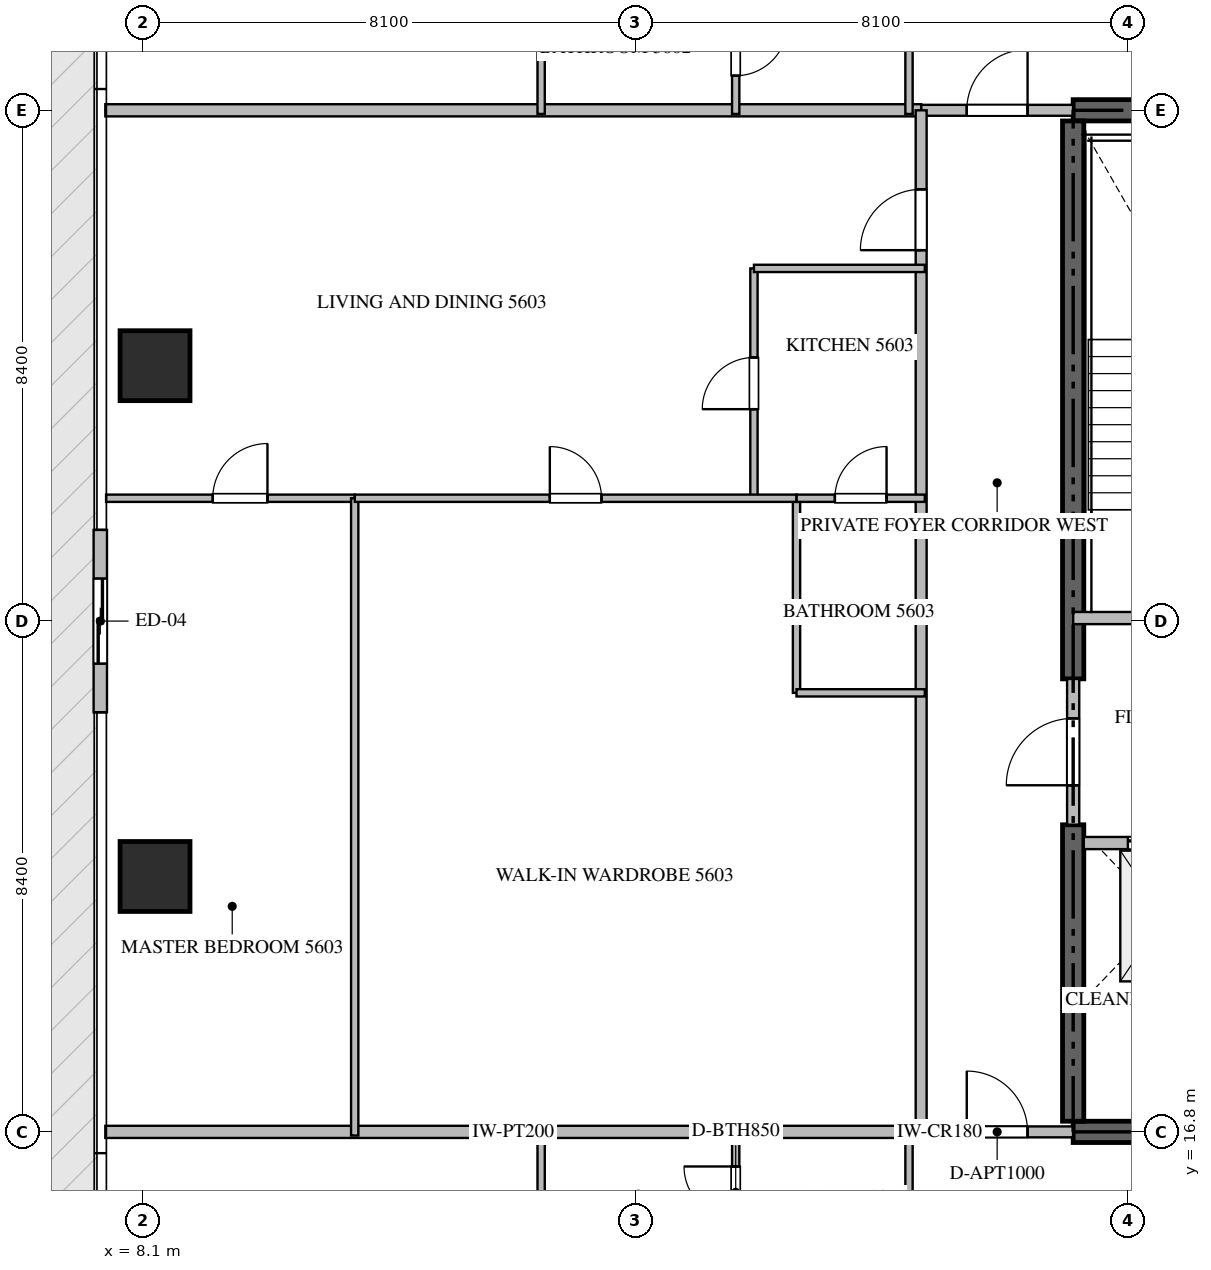
"""IFC4 building model, lengths in metres.
Left out: names, types, materials, properties, quantities, classifications, styles, units other than length and angle.
Written with IfcOpenShell. Run it as: python <this file> out.ifc"""

import sys

from ifc_helpers import new_model, si_unit, direction, frame, frame_2d, origin, origin_2d, place, context, subcontext, project, spatial, rectangle, extrude, source, transform, mapped, element, fill, save


model = new_model("IFC4")
c1 = context("Model", 3, precision=1e-05, world=origin(), true_north=direction((0.0, 1.0)))
c2 = subcontext(c1, "Body", "Model", "MODEL_VIEW")
j1 = project(units=[si_unit("LENGTHUNIT", "METRE"), si_unit("PLANEANGLEUNIT", "RADIAN")], contexts=[c1])
p1 = place(None, origin())
s1 = spatial("IfcSite", under=j1, at=p1, CompositionType="ELEMENT")
p2 = place(p1, origin())
s2 = spatial("IfcBuilding", under=s1, at=p2, CompositionType="ELEMENT")
p3 = place(p2, frame((0.0, 0.0, 225.85)))
s3 = spatial("IfcBuildingStorey", under=s2, at=p3, CompositionType="ELEMENT", Elevation=225.85)
for number, where, z_axis, x_axis in (
    (1, (23.4, 16.8, -0.26), (0.0, 0.0, 1.0), (1.0, 0.0, 0.0)),
    (2, (41.4, 33.6, -0.26), (0.0, 0.0, 1.0), (-1.0, 0.0, 0.0)),
):
    element("IfcWall", number, at=place(p3, frame(where, z_axis=z_axis, x_axis=x_axis)), inside=s3, PredefinedType="SHEAR", context=c2, shape_type="SweptSolid", body=[
        extrude(rectangle(XDim=18.0, YDim=0.35, at=frame_2d((9.0, 0.0))), origin(), (0.0, 0.0, 1.0), 3.848),
    ])
p4 = place(p3, frame((23.4, 16.975, -0.26), z_axis=(0.0, 0.0, 1.0), x_axis=(0.0, 1.0, 0.0)))
e3 = element("IfcWall", 3, at=p4, inside=s3, PredefinedType="SHEAR", context=c2, shape_type="SweptSolid", body=[
    extrude(rectangle(XDim=4.875, YDim=0.35, at=frame_2d((2.438, 0.0))), origin(), (0.0, 0.0, 1.0), 3.848),
])
p5 = place(p3, frame((23.4, 24.25, -0.26), z_axis=(0.0, 0.0, 1.0), x_axis=(0.0, 1.0, 0.0)))
e4 = element("IfcWall", 4, at=p5, inside=s3, PredefinedType="SHEAR", context=c2, shape_type="SweptSolid", body=[
    extrude(rectangle(XDim=9.175, YDim=0.35, at=frame_2d((4.587, 0.0))), origin(), (0.0, 0.0, 1.0), 3.848),
])
m1 = source(origin(), c2, "Body", "SweptSolid", [
    extrude(rectangle(XDim=1.15, YDim=1.15, at=origin_2d()), origin(), (0.0, 0.0, 1.0), 3.85),
])
for number, where, z_axis, x_axis in (
    (5, (8.3, 21.0, -0.26), (0.0, 0.0, 1.0), (1.0, 0.0, 0.0)),
    (6, (8.3, 29.4, -0.26), (0.0, 0.0, 1.0), (1.0, 0.0, 0.0)),
):
    element("IfcColumn", number, at=place(p3, frame(where, z_axis=z_axis, x_axis=x_axis)), inside=s3, PredefinedType="COLUMN", context=c2, shape_type="MappedRepresentation", body=[
        mapped(m1, transform((0.0, 0.0, 0.0), scale=1.0)),
    ])
p6 = place(p3, frame((7.4, 26.7, 0.0), z_axis=(0.0, 0.0, 1.0), x_axis=(0.0, -1.0, 0.0)))
e7 = element("IfcWall", 7, at=p6, inside=s3, PredefinedType="ELEMENTEDWALL", context=c2, shape_type="SweptSolid", body=[
    extrude(rectangle(XDim=3.0, YDim=0.22, at=frame_2d((1.5, 0.0))), origin(), (0.0, 0.0, 1.0), 3.575),
])
p7 = place(p6, frame((0.8, 0.0, 0.0)))
e8 = element("IfcOpeningElement", 8, at=p7, cuts=e7, PredefinedType="OPENING", context=c2, shape_type="SweptSolid", body=[
    extrude(rectangle(XDim=1.4, YDim=2.25, at=frame_2d((0.7, 1.125))), frame((0.0, 0.12, 0.0), z_axis=(0.0, -1.0, 0.0), x_axis=(1.0, 0.0, 0.0)), (0.0, 0.0, 1.0), 0.24),
])
p8 = place(p3, frame((23.4, 25.25, 0.0), z_axis=(0.0, 0.0, 1.0), x_axis=(1.0, 0.0, 0.0)))
e9 = element("IfcWall", 9, at=p8, inside=s3, PredefinedType="STANDARD", context=c2, shape_type="SweptSolid", body=[
    extrude(rectangle(XDim=4.45, YDim=0.2, at=frame_2d((2.225, 0.0))), origin(), (0.0, 0.0, 1.0), 3.59),
])
p9 = place(p8, frame((1.65, 0.0, 0.0)))
e10 = element("IfcOpeningElement", 10, at=p9, cuts=e9, PredefinedType="OPENING", context=c2, shape_type="SweptSolid", body=[
    extrude(rectangle(XDim=1.1, YDim=2.15, at=frame_2d((0.55, 1.075))), frame((0.0, 0.11, 0.0), z_axis=(0.0, -1.0, 0.0), x_axis=(1.0, 0.0, 0.0)), (0.0, 0.0, 1.0), 0.22),
])
p10 = place(p3, frame((23.575, 21.55, 0.0), z_axis=(0.0, 0.0, 1.0), x_axis=(1.0, 0.0, 0.0)))
e11 = element("IfcWall", 11, at=p10, inside=s3, PredefinedType="STANDARD", context=c2, shape_type="SweptSolid", body=[
    extrude(rectangle(XDim=2.475, YDim=0.2, at=frame_2d((1.238, 0.0))), origin(), (0.0, 0.0, 1.0), 3.59),
])
p11 = place(p10, frame((0.725, 0.0, 0.0)))
e12 = element("IfcOpeningElement", 12, at=p11, cuts=e11, PredefinedType="OPENING", context=c2, shape_type="SweptSolid", body=[
    extrude(rectangle(XDim=1.2, YDim=2.2, at=frame_2d((0.6, 1.1))), frame((0.0, 0.11, 0.0), z_axis=(0.0, -1.0, 0.0), x_axis=(1.0, 0.0, 0.0)), (0.0, 0.0, 1.0), 0.22),
])
p12 = place(p3, frame((23.575, 19.05, 0.0), z_axis=(0.0, 0.0, 1.0), x_axis=(1.0, 0.0, 0.0)))
e13 = element("IfcWall", 13, at=p12, inside=s3, PredefinedType="STANDARD", context=c2, shape_type="SweptSolid", body=[
    extrude(rectangle(XDim=2.475, YDim=0.2, at=frame_2d((1.238, 0.0))), origin(), (0.0, 0.0, 1.0), 3.59),
])
p13 = place(p3, frame((23.4, 21.852, 0.0), z_axis=(0.0, 0.0, 1.0), x_axis=(0.0, 1.0, 0.0)))
e14 = element("IfcWall", 14, at=p13, inside=s3, PredefinedType="STANDARD", context=c2, shape_type="SweptSolid", body=[
    extrude(rectangle(XDim=2.396, YDim=0.2, at=frame_2d((1.198, 0.0))), origin(), (0.0, 0.0, 1.0), 3.59),
])
p14 = place(p13, frame((0.648, 0.0, 0.0)))
e15 = element("IfcOpeningElement", 15, at=p14, cuts=e14, PredefinedType="OPENING", context=c2, shape_type="SweptSolid", body=[
    extrude(rectangle(XDim=1.1, YDim=2.15, at=frame_2d((0.55, 1.075))), frame((0.0, 0.11, 0.0), z_axis=(0.0, -1.0, 0.0), x_axis=(1.0, 0.0, 0.0)), (0.0, 0.0, 1.0), 0.22),
])
for number, where, z_axis, x_axis in (
    (16, (7.482, 16.8, 0.0), (0.0, 0.0, 1.0), (1.0, 0.0, 0.0)),
    (17, (7.482, 33.6, 0.0), (0.0, 0.0, 1.0), (1.0, 0.0, 0.0)),
):
    element("IfcWall", number, at=place(p3, frame(where, z_axis=z_axis, x_axis=x_axis)), inside=s3, PredefinedType="PARTITIONING", context=c2, shape_type="SweptSolid", body=[
        extrude(rectangle(XDim=13.418, YDim=0.2, at=frame_2d((6.709, 0.0))), origin(), (0.0, 0.0, 1.0), 3.59),
    ])
p15 = place(p3, frame((20.902, 16.8, 0.0), z_axis=(0.0, 0.0, 1.0), x_axis=(1.0, 0.0, 0.0)))
e18 = element("IfcWall", 18, at=p15, inside=s3, PredefinedType="PARTITIONING", context=c2, shape_type="SweptSolid", body=[
    extrude(rectangle(XDim=2.496, YDim=0.18, at=frame_2d((1.248, 0.0))), origin(), (0.0, 0.0, 1.0), 3.59),
])
p16 = place(p15, frame((0.748, 0.0, 0.0)))
e19 = element("IfcOpeningElement", 19, at=p16, cuts=e18, PredefinedType="OPENING", context=c2, shape_type="SweptSolid", body=[
    extrude(rectangle(XDim=1.0, YDim=2.15, at=frame_2d((0.5, 1.075))), frame((0.0, 0.1, 0.0), z_axis=(0.0, -1.0, 0.0), x_axis=(1.0, 0.0, 0.0)), (0.0, 0.0, 1.0), 0.2),
])
p17 = place(p3, frame((20.902, 33.6, 0.0), z_axis=(0.0, 0.0, 1.0), x_axis=(1.0, 0.0, 0.0)))
e20 = element("IfcWall", 20, at=p17, inside=s3, PredefinedType="PARTITIONING", context=c2, shape_type="SweptSolid", body=[
    extrude(rectangle(XDim=2.496, YDim=0.18, at=frame_2d((1.248, 0.0))), origin(), (0.0, 0.0, 1.0), 3.59),
])
p18 = place(p17, frame((0.748, 0.0, 0.0)))
e21 = element("IfcOpeningElement", 21, at=p18, cuts=e20, PredefinedType="OPENING", context=c2, shape_type="SweptSolid", body=[
    extrude(rectangle(XDim=1.0, YDim=2.15, at=frame_2d((0.5, 1.075))), frame((0.0, 0.1, 0.0), z_axis=(0.0, -1.0, 0.0), x_axis=(1.0, 0.0, 0.0)), (0.0, 0.0, 1.0), 0.2),
])
p19 = place(p3, frame((20.9, 16.8, 0.0), z_axis=(0.0, 0.0, 1.0), x_axis=(0.0, 1.0, 0.0)))
e22 = element("IfcWall", 22, at=p19, inside=s3, PredefinedType="PARTITIONING", context=c2, shape_type="SweptSolid", body=[
    extrude(rectangle(XDim=16.8, YDim=0.18, at=frame_2d((8.4, 0.0))), origin(), (0.0, 0.0, 1.0), 3.59),
])
p20 = place(p19, frame((14.5, 0.0, 0.0)))
e23 = element("IfcOpeningElement", 23, at=p20, cuts=e22, PredefinedType="OPENING", context=c2, shape_type="SweptSolid", body=[
    extrude(rectangle(XDim=1.0, YDim=2.15, at=frame_2d((0.5, 1.075))), frame((0.0, 0.1, 0.0), z_axis=(0.0, -1.0, 0.0), x_axis=(1.0, 0.0, 0.0)), (0.0, 0.0, 1.0), 0.2),
])
p21 = place(p3, frame((20.7, 14.05, 0.0), z_axis=(0.0, 0.0, 1.0), x_axis=(0.0, 1.0, 0.0)))
e24 = element("IfcWall", 24, at=p21, inside=s3, PredefinedType="PARTITIONING", context=c2, shape_type="SweptSolid", body=[
    extrude(rectangle(XDim=2.81, YDim=0.12, at=frame_2d((1.405, 0.0))), origin(), (0.0, 0.0, 1.0), 3.59),
])
p22 = place(p3, frame((14.65, 14.75, 0.0), z_axis=(0.0, 0.0, 1.0), x_axis=(0.0, 1.0, 0.0)))
e25 = element("IfcWall", 25, at=p22, inside=s3, PredefinedType="PARTITIONING", context=c2, shape_type="SweptSolid", body=[
    extrude(rectangle(XDim=2.11, YDim=0.12, at=frame_2d((1.055, 0.0))), origin(), (0.0, 0.0, 1.0), 3.59),
])
p23 = place(p3, frame((17.85, 14.752, 0.0), z_axis=(0.0, 0.0, 1.0), x_axis=(0.0, 1.0, 0.0)))
e26 = element("IfcWall", 26, at=p23, inside=s3, PredefinedType="PARTITIONING", context=c2, shape_type="SweptSolid", body=[
    extrude(rectangle(XDim=2.108, YDim=0.12, at=frame_2d((1.054, 0.0))), origin(), (0.0, 0.0, 1.0), 3.59),
])
p24 = place(p23, frame((0.629, 0.0, 0.0)))
e27 = element("IfcOpeningElement", 27, at=p24, cuts=e26, PredefinedType="OPENING", context=c2, shape_type="SweptSolid", body=[
    extrude(rectangle(XDim=0.85, YDim=2.1, at=frame_2d((0.425, 1.05))), frame((0.0, 0.07, 0.0), z_axis=(0.0, -1.0, 0.0), x_axis=(1.0, 0.0, 0.0)), (0.0, 0.0, 1.0), 0.14),
])
p25 = place(p3, frame((20.7, 36.35, 0.0), z_axis=(0.0, 0.0, 1.0), x_axis=(0.0, -1.0, 0.0)))
e28 = element("IfcWall", 28, at=p25, inside=s3, PredefinedType="PARTITIONING", context=c2, shape_type="SweptSolid", body=[
    extrude(rectangle(XDim=2.81, YDim=0.12, at=frame_2d((1.405, 0.0))), origin(), (0.0, 0.0, 1.0), 3.59),
])
p26 = place(p3, frame((14.65, 35.65, 0.0), z_axis=(0.0, 0.0, 1.0), x_axis=(0.0, -1.0, 0.0)))
e29 = element("IfcWall", 29, at=p26, inside=s3, PredefinedType="PARTITIONING", context=c2, shape_type="SweptSolid", body=[
    extrude(rectangle(XDim=2.11, YDim=0.12, at=frame_2d((1.055, 0.0))), origin(), (0.0, 0.0, 1.0), 3.59),
])
p27 = place(p3, frame((17.85, 35.648, 0.0), z_axis=(0.0, 0.0, 1.0), x_axis=(0.0, -1.0, 0.0)))
e30 = element("IfcWall", 30, at=p27, inside=s3, PredefinedType="PARTITIONING", context=c2, shape_type="SweptSolid", body=[
    extrude(rectangle(XDim=2.108, YDim=0.12, at=frame_2d((1.054, 0.0))), origin(), (0.0, 0.0, 1.0), 3.59),
])
p28 = place(p27, frame((0.629, 0.0, 0.0)))
e31 = element("IfcOpeningElement", 31, at=p28, cuts=e30, PredefinedType="OPENING", context=c2, shape_type="SweptSolid", body=[
    extrude(rectangle(XDim=0.85, YDim=2.1, at=frame_2d((0.425, 1.05))), frame((0.0, 0.07, 0.0), z_axis=(0.0, -1.0, 0.0), x_axis=(1.0, 0.0, 0.0)), (0.0, 0.0, 1.0), 0.14),
])
p29 = place(p3, frame((18.15, 27.22, 0.0), z_axis=(0.0, 0.0, 1.0), x_axis=(0.0, 1.0, 0.0)))
e32 = element("IfcWall", 32, at=p29, inside=s3, PredefinedType="PARTITIONING", context=c2, shape_type="SweptSolid", body=[
    extrude(rectangle(XDim=3.78, YDim=0.12, at=frame_2d((1.89, 0.0))), origin(), (0.0, 0.0, 1.0), 3.59),
])
p30 = place(p29, frame((1.465, 0.0, 0.0)))
e33 = element("IfcOpeningElement", 33, at=p30, cuts=e32, PredefinedType="OPENING", context=c2, shape_type="SweptSolid", body=[
    extrude(rectangle(XDim=0.85, YDim=2.1, at=frame_2d((0.425, 1.05))), frame((0.0, 0.07, 0.0), z_axis=(0.0, -1.0, 0.0), x_axis=(1.0, 0.0, 0.0)), (0.0, 0.0, 1.0), 0.14),
])
p31 = place(p3, frame((18.15, 31.0, 0.0), z_axis=(0.0, 0.0, 1.0), x_axis=(1.0, 0.0, 0.0)))
e34 = element("IfcWall", 34, at=p31, inside=s3, PredefinedType="PARTITIONING", context=c2, shape_type="SweptSolid", body=[
    extrude(rectangle(XDim=2.81, YDim=0.12, at=frame_2d((1.405, 0.0))), origin(), (0.0, 0.0, 1.0), 3.59),
])
p32 = place(p3, frame((7.495, 27.22, 0.0), z_axis=(0.0, 0.0, 1.0), x_axis=(1.0, 0.0, 0.0)))
e35 = element("IfcWall", 35, at=p32, inside=s3, PredefinedType="PARTITIONING", context=c2, shape_type="SweptSolid", body=[
    extrude(rectangle(XDim=4.089, YDim=0.12, at=frame_2d((2.044, 0.0))), origin(), (0.0, 0.0, 1.0), 3.59),
])
p33 = place(p32, frame((1.754, 0.0, 0.0)))
e36 = element("IfcOpeningElement", 36, at=p33, cuts=e35, PredefinedType="OPENING", context=c2, shape_type="SweptSolid", body=[
    extrude(rectangle(XDim=0.9, YDim=2.1, at=frame_2d((0.45, 1.05))), frame((0.0, 0.07, 0.0), z_axis=(0.0, -1.0, 0.0), x_axis=(1.0, 0.0, 0.0)), (0.0, 0.0, 1.0), 0.14),
])
p34 = place(p3, frame((11.584, 16.74, 0.0), z_axis=(0.0, 0.0, 1.0), x_axis=(0.0, 1.0, 0.0)))
e37 = element("IfcWall", 37, at=p34, inside=s3, PredefinedType="PARTITIONING", context=c2, shape_type="SweptSolid", body=[
    extrude(rectangle(XDim=10.48, YDim=0.12, at=frame_2d((5.24, 0.0))), origin(), (0.0, 0.0, 1.0), 3.59),
])
p35 = place(p3, frame((18.85, 24.02, 0.0), z_axis=(0.0, 0.0, 1.0), x_axis=(0.0, 1.0, 0.0)))
e38 = element("IfcWall", 38, at=p35, inside=s3, PredefinedType="PARTITIONING", context=c2, shape_type="SweptSolid", body=[
    extrude(rectangle(XDim=3.2, YDim=0.12, at=frame_2d((1.6, 0.0))), origin(), (0.0, 0.0, 1.0), 3.59),
])
p36 = place(p3, frame((18.85, 24.02, 0.0), z_axis=(0.0, 0.0, 1.0), x_axis=(1.0, 0.0, 0.0)))
e39 = element("IfcWall", 39, at=p36, inside=s3, PredefinedType="PARTITIONING", context=c2, shape_type="SweptSolid", body=[
    extrude(rectangle(XDim=2.11, YDim=0.12, at=frame_2d((1.055, 0.0))), origin(), (0.0, 0.0, 1.0), 3.59),
])
p37 = place(p3, frame((11.586, 27.22, 0.0), z_axis=(0.0, 0.0, 1.0), x_axis=(1.0, 0.0, 0.0)))
e40 = element("IfcWall", 40, at=p37, inside=s3, PredefinedType="PARTITIONING", context=c2, shape_type="SweptSolid", body=[
    extrude(rectangle(XDim=7.264, YDim=0.12, at=frame_2d((3.632, 0.0))), origin(), (0.0, 0.0, 1.0), 3.59),
])
p38 = place(p37, frame((3.207, 0.0, 0.0)))
e41 = element("IfcOpeningElement", 41, at=p38, cuts=e40, PredefinedType="OPENING", context=c2, shape_type="SweptSolid", body=[
    extrude(rectangle(XDim=0.85, YDim=2.1, at=frame_2d((0.425, 1.05))), frame((0.0, 0.07, 0.0), z_axis=(0.0, -1.0, 0.0), x_axis=(1.0, 0.0, 0.0)), (0.0, 0.0, 1.0), 0.14),
])
p39 = place(p3, frame((18.852, 27.22, 0.0), z_axis=(0.0, 0.0, 1.0), x_axis=(1.0, 0.0, 0.0)))
e42 = element("IfcWall", 42, at=p39, inside=s3, PredefinedType="PARTITIONING", context=c2, shape_type="SweptSolid", body=[
    extrude(rectangle(XDim=2.108, YDim=0.12, at=frame_2d((1.054, 0.0))), origin(), (0.0, 0.0, 1.0), 3.59),
])
p40 = place(p39, frame((0.629, 0.0, 0.0)))
e43 = element("IfcOpeningElement", 43, at=p40, cuts=e42, PredefinedType="OPENING", context=c2, shape_type="SweptSolid", body=[
    extrude(rectangle(XDim=0.85, YDim=2.1, at=frame_2d((0.425, 1.05))), frame((0.0, 0.07, 0.0), z_axis=(0.0, -1.0, 0.0), x_axis=(1.0, 0.0, 0.0)), (0.0, 0.0, 1.0), 0.14),
])
m2 = source(origin(), c2, "Body", "SweptSolid", [
    extrude(rectangle(XDim=1.4, YDim=2.25, at=frame_2d((0.7, 1.125))), frame((0.0, 0.025, 0.0), z_axis=(0.0, -1.0, 0.0), x_axis=(1.0, 0.0, 0.0)), (0.0, 0.0, 1.0), 0.05),
])
p41 = place(p7, origin())
e44 = element("IfcDoor", 44, at=p41, inside=s3, OperationType="SLIDING_TO_LEFT", PredefinedType="DOOR", context=c2, shape_type="MappedRepresentation", body=[
    mapped(m2, transform((0.0, 0.0, 0.0), scale=1.0)),
])
fill(e8, e44)
m3 = source(origin(), c2, "Body", "SweptSolid", [
    extrude(rectangle(XDim=1.2, YDim=2.2, at=frame_2d((0.6, 1.1))), frame((0.0, 0.025, 0.0), z_axis=(0.0, -1.0, 0.0), x_axis=(1.0, 0.0, 0.0)), (0.0, 0.0, 1.0), 0.05),
])
p42 = place(p11, origin())
e45 = element("IfcDoor", 45, at=p42, inside=s3, OperationType="DOUBLE_DOOR_SLIDING", PredefinedType="DOOR", context=c2, shape_type="MappedRepresentation", body=[
    mapped(m3, transform((0.0, 0.0, 0.0), scale=1.0)),
])
fill(e12, e45)
m4 = source(origin(), c2, "Body", "SweptSolid", [
    extrude(rectangle(XDim=1.1, YDim=2.15, at=frame_2d((0.55, 1.075))), frame((0.0, 0.025, 0.0), z_axis=(0.0, -1.0, 0.0), x_axis=(1.0, 0.0, 0.0)), (0.0, 0.0, 1.0), 0.05),
])
p43 = place(p14, origin())
e46 = element("IfcDoor", 46, at=p43, inside=s3, OperationType="SINGLE_SWING_LEFT", PredefinedType="DOOR", context=c2, shape_type="MappedRepresentation", body=[
    mapped(m4, transform((0.0, 0.0, 0.0), scale=1.0)),
])
fill(e15, e46)
m5 = source(origin(), c2, "Body", "SweptSolid", [
    extrude(rectangle(XDim=1.0, YDim=2.15, at=frame_2d((0.5, 1.075))), frame((0.0, 0.025, 0.0), z_axis=(0.0, -1.0, 0.0), x_axis=(1.0, 0.0, 0.0)), (0.0, 0.0, 1.0), 0.05),
])
p44 = place(p16, origin())
e47 = element("IfcDoor", 47, at=p44, inside=s3, OperationType="SINGLE_SWING_LEFT", PredefinedType="DOOR", context=c2, shape_type="MappedRepresentation", body=[
    mapped(m5, transform((0.0, 0.0, 0.0), scale=1.0)),
])
fill(e19, e47)
p45 = place(p18, origin())
e48 = element("IfcDoor", 48, at=p45, inside=s3, OperationType="SINGLE_SWING_RIGHT", PredefinedType="DOOR", context=c2, shape_type="MappedRepresentation", body=[
    mapped(m5, transform((0.0, 0.0, 0.0), scale=1.0)),
])
fill(e21, e48)
p46 = place(p20, origin())
e49 = element("IfcDoor", 49, at=p46, inside=s3, OperationType="SINGLE_SWING_LEFT", PredefinedType="DOOR", context=c2, shape_type="MappedRepresentation", body=[
    mapped(m5, transform((0.0, 0.0, 0.0), scale=1.0)),
])
fill(e23, e49)
m6 = source(origin(), c2, "Body", "SweptSolid", [
    extrude(rectangle(XDim=0.85, YDim=2.1, at=frame_2d((0.425, 1.05))), frame((0.0, 0.025, 0.0), z_axis=(0.0, -1.0, 0.0), x_axis=(1.0, 0.0, 0.0)), (0.0, 0.0, 1.0), 0.05),
])
p47 = place(p24, origin())
e50 = element("IfcDoor", 50, at=p47, inside=s3, OperationType="SINGLE_SWING_RIGHT", PredefinedType="DOOR", context=c2, shape_type="MappedRepresentation", body=[
    mapped(m6, transform((0.0, 0.0, 0.0), scale=1.0)),
])
fill(e27, e50)
p48 = place(p28, origin())
e51 = element("IfcDoor", 51, at=p48, inside=s3, OperationType="SINGLE_SWING_LEFT", PredefinedType="DOOR", context=c2, shape_type="MappedRepresentation", body=[
    mapped(m6, transform((0.0, 0.0, 0.0), scale=1.0)),
])
fill(e31, e51)
p49 = place(p30, origin())
e52 = element("IfcDoor", 52, at=p49, inside=s3, OperationType="SINGLE_SWING_LEFT", PredefinedType="DOOR", context=c2, shape_type="MappedRepresentation", body=[
    mapped(m6, transform((0.0, 0.0, 0.0), scale=1.0)),
])
fill(e33, e52)
m7 = source(origin(), c2, "Body", "SweptSolid", [
    extrude(rectangle(XDim=0.9, YDim=2.1, at=frame_2d((0.45, 1.05))), frame((0.0, 0.025, 0.0), z_axis=(0.0, -1.0, 0.0), x_axis=(1.0, 0.0, 0.0)), (0.0, 0.0, 1.0), 0.05),
])
p50 = place(p33, origin())
e53 = element("IfcDoor", 53, at=p50, inside=s3, OperationType="SINGLE_SWING_RIGHT", PredefinedType="DOOR", context=c2, shape_type="MappedRepresentation", body=[
    mapped(m7, transform((0.0, 0.0, 0.0), scale=1.0)),
])
fill(e36, e53)
p51 = place(p38, origin())
e54 = element("IfcDoor", 54, at=p51, inside=s3, OperationType="SINGLE_SWING_LEFT", PredefinedType="DOOR", context=c2, shape_type="MappedRepresentation", body=[
    mapped(m6, transform((0.0, 0.0, 0.0), scale=1.0)),
])
fill(e41, e54)
p52 = place(p40, origin())
e55 = element("IfcDoor", 55, at=p52, inside=s3, OperationType="SINGLE_SWING_RIGHT", PredefinedType="DOOR", context=c2, shape_type="MappedRepresentation", body=[
    mapped(m6, transform((0.0, 0.0, 0.0), scale=1.0)),
])
fill(e43, e55)
save(model, sys.argv[1])
